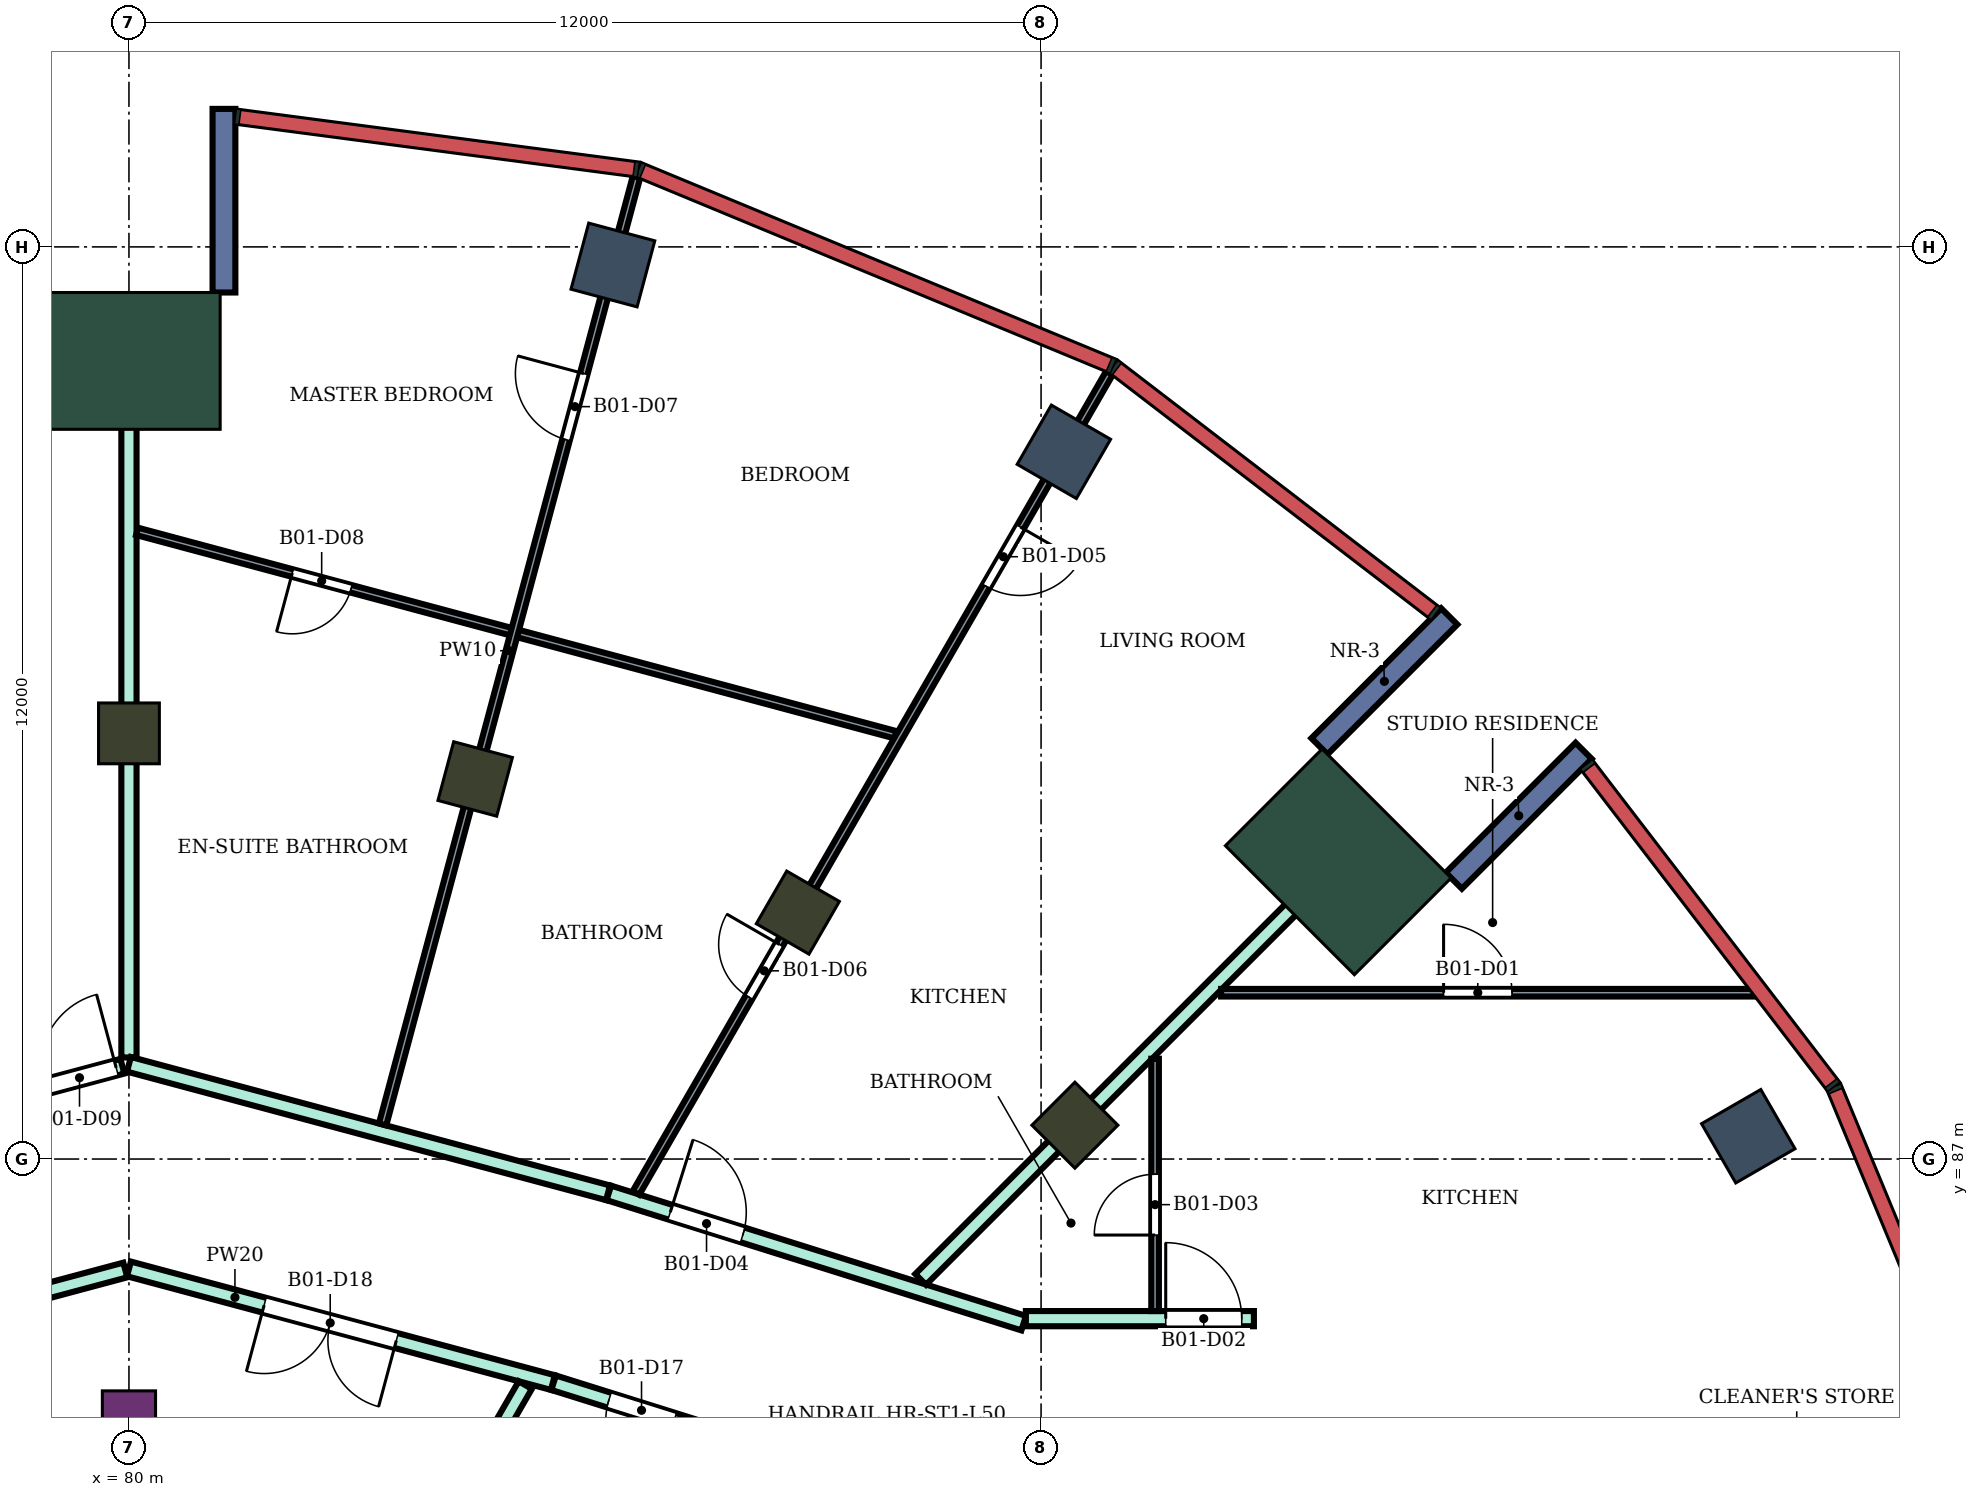
"""IFC4 building model, lengths in metres.
Left out: names, types, materials, properties, quantities, classifications, styles, units other than length and angle.
Written with IfcOpenShell. Run it as: python <this file> out.ifc"""

import sys

from ifc_helpers import new_model, si_unit, direction, frame, frame_2d, origin, origin_2d, place, context, subcontext, project, spatial, rectangle, extrude, element, fill, save


model = new_model("IFC4")
c1 = context("Model", 3, precision=1e-05, world=origin(), true_north=direction((0.0, 1.0)))
c2 = subcontext(c1, "Body", "Model", "MODEL_VIEW")
j1 = project(units=[si_unit("LENGTHUNIT", "METRE"), si_unit("PLANEANGLEUNIT", "RADIAN")], contexts=[c1])
p1 = place(None, origin())
s1 = spatial("IfcSite", under=j1, at=p1, CompositionType="ELEMENT")
p2 = place(p1, origin())
s2 = spatial("IfcBuilding", under=s1, at=p2, CompositionType="ELEMENT")
p3 = place(p2, frame((0.0, 0.0, 216.7)))
s3 = spatial("IfcBuildingStorey", under=s2, at=p3, CompositionType="ELEMENT", Elevation=216.7)
for number, where, z_axis, x_axis in (
    (1, (101.304, 87.3, 0.0), (0.0, 0.0, 1.0), (0.866, 0.5, 0.0)),
    (2, (92.3, 96.304, 0.0), (0.0, 0.0, 1.0), (0.5, 0.866, 0.0)),
    (3, (86.367, 98.762, 0.0), (0.0, 0.0, 1.0), (0.259, 0.966, 0.0)),
):
    element("IfcColumn", number, at=place(p3, frame(where, z_axis=z_axis, x_axis=x_axis)), inside=s3, PredefinedType="COLUMN", context=c2, shape_type="SweptSolid", body=[
        extrude(rectangle(XDim=0.9, YDim=0.9, at=origin_2d()), origin(), (0.0, 0.0, 1.0), 4.2),
    ])
for number, where, z_axis, x_axis in (
    (4, (92.445, 87.445, 0.0), (0.0, 0.0, 1.0), (0.707, 0.707, 0.0)),
    (5, (88.8, 90.242, 0.0), (0.0, 0.0, 1.0), (0.5, 0.866, 0.0)),
    (6, (84.555, 92.0, 0.0), (0.0, 0.0, 1.0), (0.259, 0.966, 0.0)),
    (7, (80.0, 92.6, 0.0), (0.0, 0.0, 1.0), (0.0, 1.0, 0.0)),
):
    element("IfcColumn", number, at=place(p3, frame(where, z_axis=z_axis, x_axis=x_axis)), inside=s3, PredefinedType="COLUMN", context=c2, shape_type="SweptSolid", body=[
        extrude(rectangle(XDim=0.8, YDim=0.8, at=origin_2d()), origin(), (0.0, 0.0, 1.0), 4.2),
    ])
p4 = place(p3, frame((80.0, 83.6, 0.0), z_axis=(0.0, 0.0, 1.0), x_axis=(0.0, 1.0, 0.0)))
e8 = element("IfcColumn", 8, at=p4, inside=s3, PredefinedType="COLUMN", context=c2, shape_type="SweptSolid", body=[
    extrude(rectangle(XDim=0.7, YDim=0.7, at=origin_2d()), origin(), (0.0, 0.0, 1.0), 4.2),
])
for number, where, z_axis, x_axis in (
    (9, (95.91, 90.91, 0.0), (0.0, 0.0, 1.0), (0.707, 0.707, 0.0)),
    (10, (80.0, 97.5, 0.0), (0.0, 0.0, 1.0), (0.0, 1.0, 0.0)),
):
    element("IfcColumn", number, at=place(p3, frame(where, z_axis=z_axis, x_axis=x_axis)), inside=s3, PredefinedType="COLUMN", context=c2, shape_type="SweptSolid", body=[
        extrude(rectangle(XDim=1.8, YDim=2.4, at=origin_2d()), origin(), (0.0, 0.0, 1.0), 4.2),
    ])
for number, where, z_axis, x_axis in (
    (11, (97.43, 90.662, 0.0), (0.0, 0.0, 1.0), (0.707, 0.707, 0.0)),
    (12, (95.662, 92.43, 0.0), (0.0, 0.0, 1.0), (0.707, 0.707, 0.0)),
    (13, (81.25, 98.4, 0.0), (0.0, 0.0, 1.0), (0.0, 1.0, 0.0)),
):
    element("IfcWall", number, at=place(p3, frame(where, z_axis=z_axis, x_axis=x_axis)), inside=s3, PredefinedType="NOTDEFINED", context=c2, shape_type="SweptSolid", body=[
        extrude(rectangle(XDim=2.416, YDim=0.3, at=frame_2d((1.208, 0.0))), origin(), (0.0, 0.0, 1.0), 4.2),
    ])
p5 = place(p3, frame((73.687, 86.555, 0.0), z_axis=(0.0, 0.0, 1.0), x_axis=(0.966020868517, 0.258464081818, 0.0)))
e14 = element("IfcWall", 14, at=p5, inside=s3, PredefinedType="PARTITIONING", context=c2, shape_type="SweptSolid", body=[
    extrude(rectangle(XDim=6.446, YDim=0.2, at=frame_2d((3.223, 0.0))), origin(), (0.0, 0.0, 1.0), 3.75),
])
p6 = place(p5, frame((5.362, 0.0, 0.0)))
e15 = element("IfcOpeningElement", 15, at=p6, cuts=e14, PredefinedType="OPENING", context=c2, shape_type="SweptSolid", body=[
    extrude(rectangle(XDim=1.0, YDim=2.1, at=frame_2d((0.5, 1.05))), frame((0.0, 0.11, 0.0), z_axis=(0.0, -1.0, 0.0), x_axis=(1.0, 0.0, 0.0)), (0.0, 0.0, 1.0), 0.22),
])
p7 = place(p3, frame((74.413, 84.057, 0.0), z_axis=(0.0, 0.0, 1.0), x_axis=(0.965970849692, 0.258650956976, 0.0)))
e16 = element("IfcWall", 16, at=p7, inside=s3, PredefinedType="PARTITIONING", context=c2, shape_type="SweptSolid", body=[
    extrude(rectangle(XDim=5.734, YDim=0.2, at=frame_2d((2.867, 0.0))), origin(), (0.0, 0.0, 1.0), 3.75),
])
p8 = place(p3, frame((80.0, 85.554, 0.0), z_axis=(0.0, 0.0, 1.0), x_axis=(0.965894438951, -0.258936155845, 0.0)))
e17 = element("IfcWall", 17, at=p8, inside=s3, PredefinedType="PARTITIONING", context=c2, shape_type="SweptSolid", body=[
    extrude(rectangle(XDim=5.774, YDim=0.2, at=frame_2d((2.887, 0.0))), origin(), (0.0, 0.0, 1.0), 3.75),
])
p9 = place(p8, frame((1.841, 0.0, 0.0)))
e18 = element("IfcOpeningElement", 18, at=p9, cuts=e17, PredefinedType="OPENING", context=c2, shape_type="SweptSolid", body=[
    extrude(rectangle(XDim=1.8, YDim=2.1, at=frame_2d((0.9, 1.05))), frame((0.0, 0.11, 0.0), z_axis=(0.0, -1.0, 0.0), x_axis=(1.0, 0.0, 0.0)), (0.0, 0.0, 1.0), 0.22),
])
p10 = place(p3, frame((80.0, 88.336, 0.0), z_axis=(0.0, 0.0, 1.0), x_axis=(0.0, 1.0, 0.0)))
e19 = element("IfcWall", 19, at=p10, inside=s3, PredefinedType="PARTITIONING", context=c2, shape_type="SweptSolid", body=[
    extrude(rectangle(XDim=9.864, YDim=0.2, at=frame_2d((4.932, 0.0))), origin(), (0.0, 0.0, 1.0), 3.75),
])
p11 = place(p3, frame((80.0, 88.246, 0.0), z_axis=(0.0, 0.0, 1.0), x_axis=(0.965866355913, -0.25904088966, 0.0)))
e20 = element("IfcWall", 20, at=p11, inside=s3, PredefinedType="PARTITIONING", context=c2, shape_type="SweptSolid", body=[
    extrude(rectangle(XDim=6.526, YDim=0.2, at=frame_2d((3.263, 0.0))), origin(), (0.0, 0.0, 1.0), 3.75),
])
p12 = place(p3, frame((83.852, 81.667, 0.0), z_axis=(0.0, 0.0, 1.0), x_axis=(0.500138740334, 0.865945287196, 0.0)))
e21 = element("IfcWall", 21, at=p12, inside=s3, PredefinedType="PARTITIONING", context=c2, shape_type="SweptSolid", body=[
    extrude(rectangle(XDim=2.724, YDim=0.2, at=frame_2d((1.362, 0.0))), origin(), (0.0, 0.0, 1.0), 3.75),
])
p13 = place(p3, frame((85.587, 84.057, 0.0), z_axis=(0.0, 0.0, 1.0), x_axis=(0.954239513179, -0.299043393987, 0.0)))
e22 = element("IfcWall", 22, at=p13, inside=s3, PredefinedType="PARTITIONING", context=c2, shape_type="SweptSolid", body=[
    extrude(rectangle(XDim=2.424, YDim=0.2, at=frame_2d((1.212, 0.0))), origin(), (0.0, 0.0, 1.0), 3.75),
])
p14 = place(p13, frame((0.762, 0.0, 0.0)))
e23 = element("IfcOpeningElement", 23, at=p14, cuts=e22, PredefinedType="OPENING", context=c2, shape_type="SweptSolid", body=[
    extrude(rectangle(XDim=0.9, YDim=2.1, at=frame_2d((0.45, 1.05))), frame((0.0, 0.11, 0.0), z_axis=(0.0, -1.0, 0.0), x_axis=(1.0, 0.0, 0.0)), (0.0, 0.0, 1.0), 0.22),
])
p15 = place(p3, frame((86.313, 86.554, 0.0), z_axis=(0.0, 0.0, 1.0), x_axis=(0.954081217458, -0.299548043717, 0.0)))
e24 = element("IfcWall", 24, at=p15, inside=s3, PredefinedType="PARTITIONING", context=c2, shape_type="SweptSolid", body=[
    extrude(rectangle(XDim=5.721, YDim=0.2, at=frame_2d((2.86, 0.0))), origin(), (0.0, 0.0, 1.0), 3.75),
])
p16 = place(p15, frame((0.848, 0.0, 0.0)))
e25 = element("IfcOpeningElement", 25, at=p16, cuts=e24, PredefinedType="OPENING", context=c2, shape_type="SweptSolid", body=[
    extrude(rectangle(XDim=1.0, YDim=2.1, at=frame_2d((0.5, 1.05))), frame((0.0, 0.11, 0.0), z_axis=(0.0, -1.0, 0.0), x_axis=(1.0, 0.0, 0.0)), (0.0, 0.0, 1.0), 0.22),
])
p17 = place(p3, frame((90.416, 85.417, 0.0), z_axis=(0.0, 0.0, 1.0), x_axis=(0.707265304299, 0.706948222527, 0.0)))
e26 = element("IfcWall", 26, at=p17, inside=s3, PredefinedType="PARTITIONING", context=c2, shape_type="SweptSolid", body=[
    extrude(rectangle(XDim=8.469, YDim=0.2, at=frame_2d((4.235, 0.0))), origin(), (0.0, 0.0, 1.0), 3.75),
])
p18 = place(p3, frame((91.8, 84.9, 0.0), z_axis=(0.0, 0.0, 1.0), x_axis=(1.0, 0.0, 0.0)))
e27 = element("IfcWall", 27, at=p18, inside=s3, PredefinedType="PARTITIONING", context=c2, shape_type="SweptSolid", body=[
    extrude(rectangle(XDim=3.0, YDim=0.2, at=frame_2d((1.5, 0.0))), origin(), (0.0, 0.0, 1.0), 3.75),
])
p19 = place(p18, frame((1.84, 0.0, 0.0)))
e28 = element("IfcOpeningElement", 28, at=p19, cuts=e27, PredefinedType="OPENING", context=c2, shape_type="SweptSolid", body=[
    extrude(rectangle(XDim=1.0, YDim=2.1, at=frame_2d((0.5, 1.05))), frame((0.0, 0.11, 0.0), z_axis=(0.0, -1.0, 0.0), x_axis=(1.0, 0.0, 0.0)), (0.0, 0.0, 1.0), 0.22),
])
p20 = place(p3, frame((80.106, 95.258, 0.0), z_axis=(0.0, 0.0, 1.0), x_axis=(0.965862886122, -0.259053826862, 0.0)))
e29 = element("IfcWall", 29, at=p20, inside=s3, PredefinedType="PARTITIONING", context=c2, shape_type="SweptSolid", body=[
    extrude(rectangle(XDim=10.331, YDim=0.1, at=frame_2d((5.166, 0.0))), origin(), (0.0, 0.0, 1.0), 3.75),
])
p21 = place(p20, frame((2.115, 0.0, 0.0)))
e30 = element("IfcOpeningElement", 30, at=p21, cuts=e29, PredefinedType="OPENING", context=c2, shape_type="SweptSolid", body=[
    extrude(rectangle(XDim=0.8, YDim=2.1, at=frame_2d((0.4, 1.05))), frame((0.0, 0.06, 0.0), z_axis=(0.0, -1.0, 0.0), x_axis=(1.0, 0.0, 0.0)), (0.0, 0.0, 1.0), 0.12),
])
p22 = place(p3, frame((83.337, 87.455, 0.0), z_axis=(0.0, 0.0, 1.0), x_axis=(0.258843579905, 0.965919251875, 0.0)))
e31 = element("IfcWall", 31, at=p22, inside=s3, PredefinedType="PARTITIONING", context=c2, shape_type="SweptSolid", body=[
    extrude(rectangle(XDim=12.904, YDim=0.1, at=frame_2d((6.452, 0.0))), origin(), (0.0, 0.0, 1.0), 3.75),
])
p23 = place(p22, frame((9.326, 0.0, 0.0)))
e32 = element("IfcOpeningElement", 32, at=p23, cuts=e31, PredefinedType="OPENING", context=c2, shape_type="SweptSolid", body=[
    extrude(rectangle(XDim=0.9, YDim=2.1, at=frame_2d((0.45, 1.05))), frame((0.0, 0.06, 0.0), z_axis=(0.0, -1.0, 0.0), x_axis=(1.0, 0.0, 0.0)), (0.0, 0.0, 1.0), 0.12),
])
p24 = place(p3, frame((86.671, 86.554, 0.0), z_axis=(0.0, 0.0, 1.0), x_axis=(0.50001992892, 0.866013897511, 0.0)))
e33 = element("IfcWall", 33, at=p24, inside=s3, PredefinedType="PARTITIONING", context=c2, shape_type="SweptSolid", body=[
    extrude(rectangle(XDim=12.456, YDim=0.1, at=frame_2d((6.228, 0.0))), origin(), (0.0, 0.0, 1.0), 3.75),
])
p25 = place(p24, frame((9.215, 0.0, 0.0)))
e34 = element("IfcOpeningElement", 34, at=p25, cuts=e33, PredefinedType="OPENING", context=c2, shape_type="SweptSolid", body=[
    extrude(rectangle(XDim=0.9, YDim=2.1, at=frame_2d((0.45, 1.05))), frame((0.0, 0.06, 0.0), z_axis=(0.0, -1.0, 0.0), x_axis=(1.0, 0.0, 0.0)), (0.0, 0.0, 1.0), 0.12),
])
p26 = place(p24, frame((2.974, 0.0, 0.0)))
e35 = element("IfcOpeningElement", 35, at=p26, cuts=e33, PredefinedType="OPENING", context=c2, shape_type="SweptSolid", body=[
    extrude(rectangle(XDim=0.8, YDim=2.1, at=frame_2d((0.4, 1.05))), frame((0.0, 0.06, 0.0), z_axis=(0.0, -1.0, 0.0), x_axis=(1.0, 0.0, 0.0)), (0.0, 0.0, 1.0), 0.12),
])
p27 = place(p3, frame((93.5, 85.0, 0.0), z_axis=(0.0, 0.0, 1.0), x_axis=(0.0, 1.0, 0.0)))
e36 = element("IfcWall", 36, at=p27, inside=s3, PredefinedType="PARTITIONING", context=c2, shape_type="SweptSolid", body=[
    extrude(rectangle(XDim=3.319, YDim=0.1, at=frame_2d((1.66, 0.0))), origin(), (0.0, 0.0, 1.0), 3.75),
])
p28 = place(p27, frame((1.0, 0.0, 0.0)))
e37 = element("IfcOpeningElement", 37, at=p28, cuts=e36, PredefinedType="OPENING", context=c2, shape_type="SweptSolid", body=[
    extrude(rectangle(XDim=0.8, YDim=2.1, at=frame_2d((0.4, 1.05))), frame((0.0, 0.06, 0.0), z_axis=(0.0, -1.0, 0.0), x_axis=(1.0, 0.0, 0.0)), (0.0, 0.0, 1.0), 0.12),
])
p29 = place(p3, frame((94.369, 89.188, 0.0), z_axis=(0.0, 0.0, 1.0), x_axis=(1.0, 0.0, 0.0)))
e38 = element("IfcWall", 38, at=p29, inside=s3, PredefinedType="PARTITIONING", context=c2, shape_type="SweptSolid", body=[
    extrude(rectangle(XDim=7.031, YDim=0.1, at=frame_2d((3.516, 0.0))), origin(), (0.0, 0.0, 1.0), 3.75),
])
p30 = place(p29, frame((2.927, 0.0, 0.0)))
e39 = element("IfcOpeningElement", 39, at=p30, cuts=e38, PredefinedType="OPENING", context=c2, shape_type="SweptSolid", body=[
    extrude(rectangle(XDim=0.9, YDim=2.1, at=frame_2d((0.45, 1.05))), frame((0.0, 0.06, 0.0), z_axis=(0.0, -1.0, 0.0), x_axis=(1.0, 0.0, 0.0)), (0.0, 0.0, 1.0), 0.12),
])
p31 = place(p30, origin())
e40 = element("IfcDoor", 40, at=p31, inside=s3, OperationType="SINGLE_SWING_LEFT", PredefinedType="DOOR", context=c2, shape_type="SweptSolid", body=[
    extrude(rectangle(XDim=0.9, YDim=2.1, at=frame_2d((0.45, 1.05))), frame((0.0, 0.025, 0.0), z_axis=(0.0, -1.0, 0.0), x_axis=(1.0, 0.0, 0.0)), (0.0, 0.0, 1.0), 0.05),
])
fill(e39, e40)
p32 = place(p19, origin())
e41 = element("IfcDoor", 41, at=p32, inside=s3, OperationType="SINGLE_SWING_LEFT", PredefinedType="DOOR", context=c2, shape_type="SweptSolid", body=[
    extrude(rectangle(XDim=1.0, YDim=2.1, at=frame_2d((0.5, 1.05))), frame((0.0, 0.025, 0.0), z_axis=(0.0, -1.0, 0.0), x_axis=(1.0, 0.0, 0.0)), (0.0, 0.0, 1.0), 0.05),
])
fill(e28, e41)
p33 = place(p28, origin())
e42 = element("IfcDoor", 42, at=p33, inside=s3, OperationType="SINGLE_SWING_LEFT", PredefinedType="DOOR", context=c2, shape_type="SweptSolid", body=[
    extrude(rectangle(XDim=0.8, YDim=2.1, at=frame_2d((0.4, 1.05))), frame((0.0, 0.025, 0.0), z_axis=(0.0, -1.0, 0.0), x_axis=(1.0, 0.0, 0.0)), (0.0, 0.0, 1.0), 0.05),
])
fill(e37, e42)
p34 = place(p16, origin())
e43 = element("IfcDoor", 43, at=p34, inside=s3, OperationType="SINGLE_SWING_LEFT", PredefinedType="DOOR", context=c2, shape_type="SweptSolid", body=[
    extrude(rectangle(XDim=1.0, YDim=2.1, at=frame_2d((0.5, 1.05))), frame((0.0, 0.025, 0.0), z_axis=(0.0, -1.0, 0.0), x_axis=(1.0, 0.0, 0.0)), (0.0, 0.0, 1.0), 0.05),
])
fill(e25, e43)
p35 = place(p25, frame((0.9, 0.0, 0.0), z_axis=(0.0, 0.0, 1.0), x_axis=(-1.0, 0.0, 0.0)))
e44 = element("IfcDoor", 44, at=p35, inside=s3, OperationType="SINGLE_SWING_LEFT", PredefinedType="DOOR", context=c2, shape_type="SweptSolid", body=[
    extrude(rectangle(XDim=0.9, YDim=2.1, at=frame_2d((0.45, 1.05))), frame((0.0, 0.025, 0.0), z_axis=(0.0, -1.0, 0.0), x_axis=(1.0, 0.0, 0.0)), (0.0, 0.0, 1.0), 0.05),
])
fill(e34, e44)
p36 = place(p26, origin())
e45 = element("IfcDoor", 45, at=p36, inside=s3, OperationType="SINGLE_SWING_RIGHT", PredefinedType="DOOR", context=c2, shape_type="SweptSolid", body=[
    extrude(rectangle(XDim=0.8, YDim=2.1, at=frame_2d((0.4, 1.05))), frame((0.0, 0.025, 0.0), z_axis=(0.0, -1.0, 0.0), x_axis=(1.0, 0.0, 0.0)), (0.0, 0.0, 1.0), 0.05),
])
fill(e35, e45)
p37 = place(p23, origin())
e46 = element("IfcDoor", 46, at=p37, inside=s3, OperationType="SINGLE_SWING_RIGHT", PredefinedType="DOOR", context=c2, shape_type="SweptSolid", body=[
    extrude(rectangle(XDim=0.9, YDim=2.1, at=frame_2d((0.45, 1.05))), frame((0.0, 0.025, 0.0), z_axis=(0.0, -1.0, 0.0), x_axis=(1.0, 0.0, 0.0)), (0.0, 0.0, 1.0), 0.05),
])
fill(e32, e46)
p38 = place(p21, frame((0.8, 0.0, 0.0), z_axis=(0.0, 0.0, 1.0), x_axis=(-1.0, 0.0, 0.0)))
e47 = element("IfcDoor", 47, at=p38, inside=s3, OperationType="SINGLE_SWING_RIGHT", PredefinedType="DOOR", context=c2, shape_type="SweptSolid", body=[
    extrude(rectangle(XDim=0.8, YDim=2.1, at=frame_2d((0.4, 1.05))), frame((0.0, 0.025, 0.0), z_axis=(0.0, -1.0, 0.0), x_axis=(1.0, 0.0, 0.0)), (0.0, 0.0, 1.0), 0.05),
])
fill(e30, e47)
p39 = place(p6, origin())
e48 = element("IfcDoor", 48, at=p39, inside=s3, OperationType="SINGLE_SWING_RIGHT", PredefinedType="DOOR", context=c2, shape_type="SweptSolid", body=[
    extrude(rectangle(XDim=1.0, YDim=2.1, at=frame_2d((0.5, 1.05))), frame((0.0, 0.025, 0.0), z_axis=(0.0, -1.0, 0.0), x_axis=(1.0, 0.0, 0.0)), (0.0, 0.0, 1.0), 0.05),
])
fill(e15, e48)
p40 = place(p14, frame((0.9, 0.0, 0.0), z_axis=(0.0, 0.0, 1.0), x_axis=(-1.0, 0.0, 0.0)))
e49 = element("IfcDoor", 49, at=p40, inside=s3, OperationType="SINGLE_SWING_LEFT", PredefinedType="DOOR", context=c2, shape_type="SweptSolid", body=[
    extrude(rectangle(XDim=0.9, YDim=2.1, at=frame_2d((0.45, 1.05))), frame((0.0, 0.025, 0.0), z_axis=(0.0, -1.0, 0.0), x_axis=(1.0, 0.0, 0.0)), (0.0, 0.0, 1.0), 0.05),
])
fill(e23, e49)
p41 = place(p9, frame((1.8, 0.0, 0.0), z_axis=(0.0, 0.0, 1.0), x_axis=(-1.0, 0.0, 0.0)))
e50 = element("IfcDoor", 50, at=p41, inside=s3, OperationType="DOUBLE_DOOR_SINGLE_SWING", PredefinedType="DOOR", context=c2, shape_type="SweptSolid", body=[
    extrude(rectangle(XDim=1.8, YDim=2.1, at=frame_2d((0.9, 1.05))), frame((0.0, 0.025, 0.0), z_axis=(0.0, -1.0, 0.0), x_axis=(1.0, 0.0, 0.0)), (0.0, 0.0, 1.0), 0.05),
])
fill(e18, e50)
save(model, sys.argv[1])
